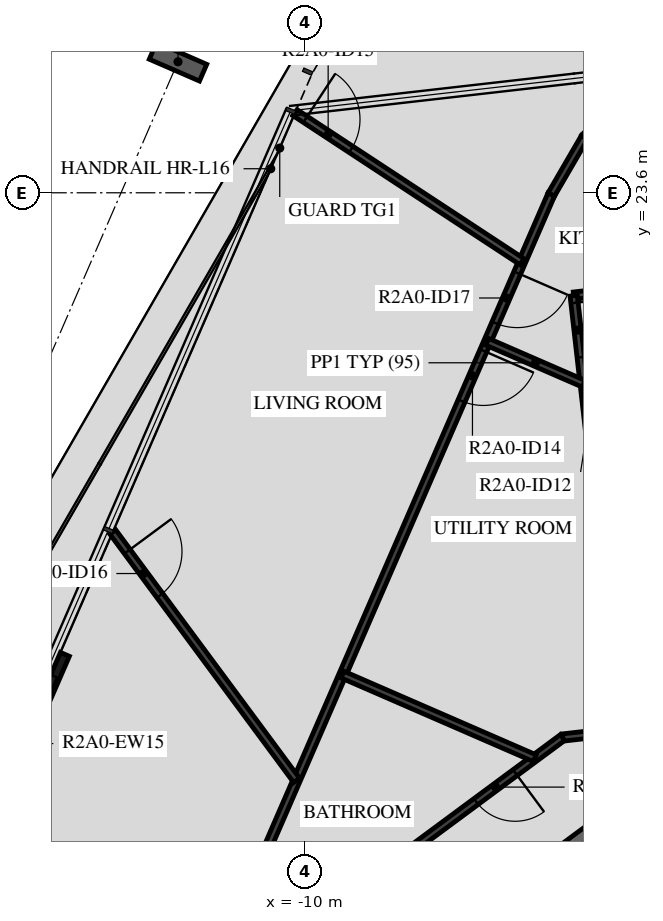
"""IFC4 building model, lengths in metres.
Left out: names, types, materials, properties, quantities, classifications, styles, units other than length and angle.
Written with IfcOpenShell. Run it as: python <this file> out.ifc"""

import sys

from ifc_helpers import new_model, si_unit, direction, frame, frame_2d, origin, origin_2d, place, context, subcontext, project, spatial, rectangle, i_section, extrude, element, fill, save


model = new_model("IFC4")
c1 = context("Model", 3, precision=1e-05, world=origin(), true_north=direction((0.0, 1.0)))
c2 = subcontext(c1, "Body", "Model", "MODEL_VIEW")
j1 = project(units=[si_unit("LENGTHUNIT", "METRE"), si_unit("PLANEANGLEUNIT", "RADIAN")], contexts=[c1])
p1 = place(None, origin())
s1 = spatial("IfcSite", under=j1, at=p1, CompositionType="ELEMENT")
p2 = place(p1, origin())
s2 = spatial("IfcBuilding", under=s1, at=p2, CompositionType="ELEMENT")
p3 = place(p2, frame((0.0, 0.0, 76.7)))
s3 = spatial("IfcBuildingStorey", under=s2, at=p3, CompositionType="ELEMENT", Elevation=76.7)
p4 = place(p3, frame((-12.091, 25.754, -0.45), z_axis=(0.0, 0.0, 1.0), x_axis=(0.398749038162, 0.917060087761, 0.0)))
e1 = element("IfcColumn", 1, at=p4, inside=s3, PredefinedType="COLUMN", context=c2, shape_type="SweptSolid", body=[
    extrude(i_section(OverallWidth=0.3, OverallDepth=0.9, WebThickness=0.019, FlangeThickness=0.035, FilletRadius=0.03, at=origin_2d()), origin(), (0.0, 0.0, 1.0), 3.57),
])
p5 = place(p3, frame((-13.951, 16.01, 0.0), z_axis=(0.0, 0.0, 1.0), x_axis=(-0.398720531764, -0.917072482168, 0.0)))
e2 = element("IfcWall", 2, at=p5, inside=s3, PredefinedType="STANDARD", context=c2, shape_type="SweptSolid", body=[
    extrude(rectangle(XDim=3.2, YDim=0.16, at=frame_2d((1.6, 0.0))), origin(), (0.0, 0.0, 1.0), 3.12),
])
p6 = place(p5, frame((0.4, 0.0, 0.0)))
e3 = element("IfcOpeningElement", 3, at=p6, cuts=e2, PredefinedType="OPENING", context=c2, shape_type="SweptSolid", body=[
    extrude(rectangle(XDim=2.4, YDim=2.4, at=frame_2d((1.2, 1.2))), frame((0.0, 0.09, 0.0), z_axis=(0.0, -1.0, 0.0), x_axis=(1.0, 0.0, 0.0)), (0.0, 0.0, 1.0), 0.18),
])
p7 = place(p3, frame((-5.198, 13.196, 0.0), z_axis=(0.0, 0.0, 1.0), x_axis=(-0.803869883159, -0.594805187394, 0.0)))
e4 = element("IfcWall", 4, at=p7, inside=s3, PredefinedType="STANDARD", context=c2, shape_type="SweptSolid", body=[
    extrude(rectangle(XDim=7.342, YDim=0.2, at=frame_2d((3.671, 0.0))), origin(), (0.0, 0.0, 1.0), 3.12),
])
p8 = place(p7, frame((5.8, 0.0, 0.0)))
e5 = element("IfcOpeningElement", 5, at=p8, cuts=e4, PredefinedType="OPENING", context=c2, shape_type="SweptSolid", body=[
    extrude(rectangle(XDim=1.0, YDim=2.1, at=frame_2d((0.5, 1.05))), frame((0.0, 0.11, 0.0), z_axis=(0.0, -1.0, 0.0), x_axis=(1.0, 0.0, 0.0)), (0.0, 0.0, 1.0), 0.22),
])
p9 = place(p3, frame((-3.999, 22.089, 0.0), z_axis=(0.0, 0.0, 1.0), x_axis=(-0.993550908639, -0.113386912568, 0.0)))
e6 = element("IfcWall", 6, at=p9, inside=s3, PredefinedType="PARTITIONING", context=c2, shape_type="SweptSolid", body=[
    extrude(rectangle(XDim=1.595, YDim=0.12, at=frame_2d((0.798, 0.0))), origin(), (0.0, 0.0, 1.0), 3.12),
])
p10 = place(p3, frame((-5.584, 21.908, 0.0), z_axis=(0.0, 0.0, 1.0), x_axis=(0.113192725021, -0.993573050662, 0.0)))
e7 = element("IfcWall", 7, at=p10, inside=s3, PredefinedType="PARTITIONING", context=c2, shape_type="SweptSolid", body=[
    extrude(rectangle(XDim=7.2, YDim=0.12, at=frame_2d((3.6, 0.0))), origin(), (0.0, 0.0, 1.0), 3.12),
])
p11 = place(p10, frame((0.12, 0.0, 0.0)))
e8 = element("IfcOpeningElement", 8, at=p11, cuts=e7, PredefinedType="OPENING", context=c2, shape_type="SweptSolid", body=[
    extrude(rectangle(XDim=0.9, YDim=2.1, at=frame_2d((0.45, 1.05))), frame((0.0, 0.07, 0.0), z_axis=(0.0, -1.0, 0.0), x_axis=(1.0, 0.0, 0.0)), (0.0, 0.0, 1.0), 0.14),
])
p12 = place(p10, frame((1.658, 0.0, 0.0)))
e9 = element("IfcOpeningElement", 9, at=p12, cuts=e7, PredefinedType="OPENING", context=c2, shape_type="SweptSolid", body=[
    extrude(rectangle(XDim=0.9, YDim=2.1, at=frame_2d((0.45, 1.05))), frame((0.0, 0.07, 0.0), z_axis=(0.0, -1.0, 0.0), x_axis=(1.0, 0.0, 0.0)), (0.0, 0.0, 1.0), 0.14),
])
p13 = place(p3, frame((-4.769, 14.755, 0.0), z_axis=(0.0, 0.0, 1.0), x_axis=(-0.993568649539, -0.113231350131, 0.0)))
e10 = element("IfcWall", 10, at=p13, inside=s3, PredefinedType="PARTITIONING", context=c2, shape_type="SweptSolid", body=[
    extrude(rectangle(XDim=1.005, YDim=0.12, at=frame_2d((0.502, 0.0))), origin(), (0.0, 0.0, 1.0), 3.12),
])
p14 = place(p3, frame((-5.767, 14.641, 0.0), z_axis=(0.0, 0.0, 1.0), x_axis=(-0.803853364238, -0.594827511807, 0.0)))
e11 = element("IfcWall", 11, at=p14, inside=s3, PredefinedType="PARTITIONING", context=c2, shape_type="SweptSolid", body=[
    extrude(rectangle(XDim=8.146, YDim=0.12, at=frame_2d((4.073, 0.0))), origin(), (0.0, 0.0, 1.0), 3.12),
])
p15 = place(p14, frame((0.97, 0.0, 0.0)))
e12 = element("IfcOpeningElement", 12, at=p15, cuts=e11, PredefinedType="OPENING", context=c2, shape_type="SweptSolid", body=[
    extrude(rectangle(XDim=0.8, YDim=2.1, at=frame_2d((0.4, 1.05))), frame((0.0, 0.07, 0.0), z_axis=(0.0, -1.0, 0.0), x_axis=(1.0, 0.0, 0.0)), (0.0, 0.0, 1.0), 0.14),
])
p16 = place(p3, frame((-4.835, 25.112, 0.0), z_axis=(0.0, 0.0, 1.0), x_axis=(-0.688463067416, -0.72527140079, 0.0)))
e13 = element("IfcWall", 13, at=p16, inside=s3, PredefinedType="PARTITIONING", context=c2, shape_type="SweptSolid", body=[
    extrude(rectangle(XDim=0.829, YDim=0.12, at=frame_2d((0.415, 0.0))), origin(), (0.0, 0.0, 1.0), 3.12),
])
p17 = place(p3, frame((-5.406, 24.51, 0.0), z_axis=(0.0, 0.0, 1.0), x_axis=(-0.502487709822, -0.864584351858, 0.0)))
e14 = element("IfcWall", 14, at=p17, inside=s3, PredefinedType="PARTITIONING", context=c2, shape_type="SweptSolid", body=[
    extrude(rectangle(XDim=1.087, YDim=0.12, at=frame_2d((0.543, 0.0))), origin(), (0.0, 0.0, 1.0), 3.12),
])
p18 = place(p3, frame((-5.952, 23.571, 0.0), z_axis=(0.0, 0.0, 1.0), x_axis=(-0.398745097158, -0.917061801348, 0.0)))
e15 = element("IfcWall", 15, at=p18, inside=s3, PredefinedType="PARTITIONING", context=c2, shape_type="SweptSolid", body=[
    extrude(rectangle(XDim=14.576, YDim=0.12, at=frame_2d((7.288, 0.0))), origin(), (0.0, 0.0, 1.0), 3.12),
])
p19 = place(p18, frame((2.801, 0.0, 0.0)))
e16 = element("IfcOpeningElement", 16, at=p19, cuts=e15, PredefinedType="OPENING", context=c2, shape_type="SweptSolid", body=[
    extrude(rectangle(XDim=0.9, YDim=2.1, at=frame_2d((0.45, 1.05))), frame((0.0, 0.07, 0.0), z_axis=(0.0, -1.0, 0.0), x_axis=(1.0, 0.0, 0.0)), (0.0, 0.0, 1.0), 0.14),
])
p20 = place(p18, frame((1.405, 0.0, 0.0)))
e17 = element("IfcOpeningElement", 17, at=p20, cuts=e15, PredefinedType="OPENING", context=c2, shape_type="SweptSolid", body=[
    extrude(rectangle(XDim=0.9, YDim=2.1, at=frame_2d((0.45, 1.05))), frame((0.0, 0.07, 0.0), z_axis=(0.0, -1.0, 0.0), x_axis=(1.0, 0.0, 0.0)), (0.0, 0.0, 1.0), 0.14),
])
p21 = place(p3, frame((-7.005, 21.149, 0.0), z_axis=(0.0, 0.0, 1.0), x_axis=(0.917081274718, -0.398700307953, 0.0)))
e18 = element("IfcWall", 18, at=p21, inside=s3, PredefinedType="PARTITIONING", context=c2, shape_type="SweptSolid", body=[
    extrude(rectangle(XDim=1.73, YDim=0.12, at=frame_2d((0.865, 0.0))), origin(), (0.0, 0.0, 1.0), 3.12),
])
p22 = place(p3, frame((-10.165, 24.917, 0.0), z_axis=(0.0, 0.0, 1.0), x_axis=(0.835849562932, -0.548958566876, 0.0)))
e19 = element("IfcWall", 19, at=p22, inside=s3, PredefinedType="PARTITIONING", context=c2, shape_type="SweptSolid", body=[
    extrude(rectangle(XDim=4.465, YDim=0.12, at=frame_2d((2.232, 0.0))), origin(), (0.0, 0.0, 1.0), 2.73),
])
p23 = place(p22, frame((0.2, 0.0, 0.0)))
e20 = element("IfcOpeningElement", 20, at=p23, cuts=e19, PredefinedType="OPENING", context=c2, shape_type="SweptSolid", body=[
    extrude(rectangle(XDim=0.9, YDim=2.1, at=frame_2d((0.45, 1.05))), frame((0.0, 0.07, 0.0), z_axis=(0.0, -1.0, 0.0), x_axis=(1.0, 0.0, 0.0)), (0.0, 0.0, 1.0), 0.14),
])
p24 = place(p3, frame((-9.385, 15.676, 0.0), z_axis=(0.0, 0.0, 1.0), x_axis=(0.917068929701, -0.398728702475, 0.0)))
e21 = element("IfcWall", 21, at=p24, inside=s3, PredefinedType="PARTITIONING", context=c2, shape_type="SweptSolid", body=[
    extrude(rectangle(XDim=3.445, YDim=0.12, at=frame_2d((1.723, 0.0))), origin(), (0.0, 0.0, 1.0), 3.12),
])
p25 = place(p3, frame((-13.163, 18.022, 0.0), z_axis=(0.0, 0.0, 1.0), x_axis=(0.594797671626, -0.803875444226, 0.0)))
e22 = element("IfcWall", 22, at=p25, inside=s3, PredefinedType="PARTITIONING", context=c2, shape_type="SweptSolid", body=[
    extrude(rectangle(XDim=5.081, YDim=0.12, at=frame_2d((2.54, 0.0))), origin(), (0.0, 0.0, 1.0), 3.12),
])
p26 = place(p25, frame((0.4, 0.0, 0.0)))
e23 = element("IfcOpeningElement", 23, at=p26, cuts=e22, PredefinedType="OPENING", context=c2, shape_type="SweptSolid", body=[
    extrude(rectangle(XDim=0.9, YDim=2.1, at=frame_2d((0.45, 1.05))), frame((0.0, 0.07, 0.0), z_axis=(0.0, -1.0, 0.0), x_axis=(1.0, 0.0, 0.0)), (0.0, 0.0, 1.0), 0.14),
])
p27 = place(p6, origin())
e24 = element("IfcDoor", 24, at=p27, inside=s3, OperationType="DOUBLE_DOOR_SLIDING", PredefinedType="DOOR", context=c2, shape_type="SweptSolid", body=[
    extrude(rectangle(XDim=2.4, YDim=2.4, at=frame_2d((1.2, 1.2))), frame((0.0, 0.025, 0.0), z_axis=(0.0, -1.0, 0.0), x_axis=(1.0, 0.0, 0.0)), (0.0, 0.0, 1.0), 0.05),
])
fill(e3, e24)
p28 = place(p11, origin())
e25 = element("IfcDoor", 25, at=p28, inside=s3, OperationType="SINGLE_SWING_RIGHT", PredefinedType="DOOR", context=c2, shape_type="SweptSolid", body=[
    extrude(rectangle(XDim=0.9, YDim=2.1, at=frame_2d((0.45, 1.05))), frame((0.0, 0.025, 0.0), z_axis=(0.0, -1.0, 0.0), x_axis=(1.0, 0.0, 0.0)), (0.0, 0.0, 1.0), 0.05),
])
fill(e8, e25)
p29 = place(p15, origin())
e26 = element("IfcDoor", 26, at=p29, inside=s3, OperationType="SINGLE_SWING_LEFT", PredefinedType="DOOR", context=c2, shape_type="SweptSolid", body=[
    extrude(rectangle(XDim=0.8, YDim=2.1, at=frame_2d((0.4, 1.05))), frame((0.0, 0.025, 0.0), z_axis=(0.0, -1.0, 0.0), x_axis=(1.0, 0.0, 0.0)), (0.0, 0.0, 1.0), 0.05),
])
fill(e12, e26)
p30 = place(p19, origin())
e27 = element("IfcDoor", 27, at=p30, inside=s3, OperationType="SINGLE_SWING_LEFT", PredefinedType="DOOR", context=c2, shape_type="SweptSolid", body=[
    extrude(rectangle(XDim=0.9, YDim=2.1, at=frame_2d((0.45, 1.05))), frame((0.0, 0.025, 0.0), z_axis=(0.0, -1.0, 0.0), x_axis=(1.0, 0.0, 0.0)), (0.0, 0.0, 1.0), 0.05),
])
fill(e16, e27)
p31 = place(p23, origin())
e28 = element("IfcDoor", 28, at=p31, inside=s3, OperationType="SINGLE_SWING_LEFT", PredefinedType="DOOR", context=c2, shape_type="SweptSolid", body=[
    extrude(rectangle(XDim=0.9, YDim=2.1, at=frame_2d((0.45, 1.05))), frame((0.0, 0.025, 0.0), z_axis=(0.0, -1.0, 0.0), x_axis=(1.0, 0.0, 0.0)), (0.0, 0.0, 1.0), 0.05),
])
fill(e20, e28)
p32 = place(p26, origin())
e29 = element("IfcDoor", 29, at=p32, inside=s3, OperationType="SINGLE_SWING_RIGHT", PredefinedType="DOOR", context=c2, shape_type="SweptSolid", body=[
    extrude(rectangle(XDim=0.9, YDim=2.1, at=frame_2d((0.45, 1.05))), frame((0.0, 0.025, 0.0), z_axis=(0.0, -1.0, 0.0), x_axis=(1.0, 0.0, 0.0)), (0.0, 0.0, 1.0), 0.05),
])
fill(e23, e29)
p33 = place(p20, origin())
e30 = element("IfcDoor", 30, at=p33, inside=s3, OperationType="SINGLE_SWING_RIGHT", PredefinedType="DOOR", context=c2, shape_type="SweptSolid", body=[
    extrude(rectangle(XDim=0.9, YDim=2.1, at=frame_2d((0.45, 1.05))), frame((0.0, 0.025, 0.0), z_axis=(0.0, -1.0, 0.0), x_axis=(1.0, 0.0, 0.0)), (0.0, 0.0, 1.0), 0.05),
])
fill(e17, e30)
save(model, sys.argv[1])
